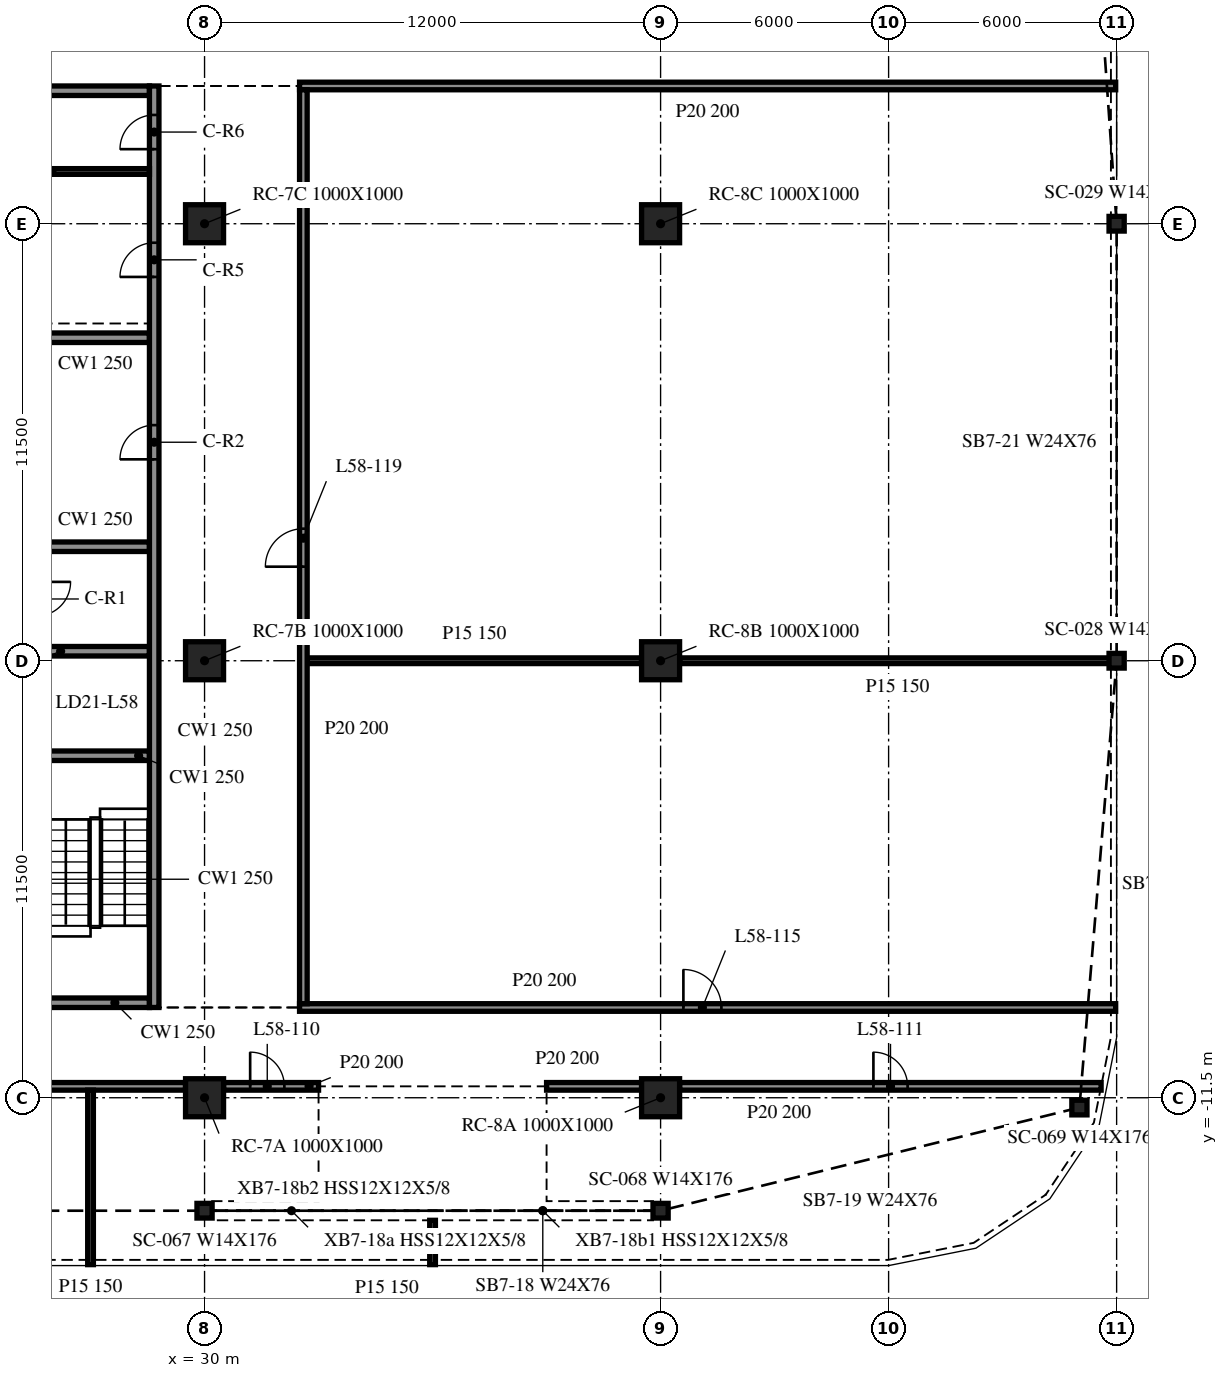
"""IFC4 building model, lengths in metres.
Left out: names, types, materials, properties, quantities, classifications, styles, units other than length and angle.
Written with IfcOpenShell. Run it as: python <this file> out.ifc"""

import sys

from ifc_helpers import new_model, si_unit, direction, frame, frame_2d, origin, origin_2d, place, context, subcontext, project, spatial, rectangle, i_section, extrude, element, fill, save


model = new_model("IFC4")
c1 = context("Model", 3, precision=1e-05, world=origin(), true_north=direction((0.0, 1.0)))
c2 = subcontext(c1, "Body", "Model", "MODEL_VIEW")
j1 = project(units=[si_unit("LENGTHUNIT", "METRE"), si_unit("PLANEANGLEUNIT", "RADIAN")], contexts=[c1])
p1 = place(None, origin())
s1 = spatial("IfcSite", under=j1, at=p1, CompositionType="ELEMENT")
p2 = place(p1, origin())
s2 = spatial("IfcBuilding", under=s1, at=p2, CompositionType="ELEMENT")
p3 = place(p2, frame((0.0, 0.0, 240.0)))
s3 = spatial("IfcBuildingStorey", under=s2, at=p3, CompositionType="ELEMENT", Elevation=240.0)
for number, where, z_axis, x_axis in (
    (1, (30.0, -11.5, -0.34), (0.0, 0.0, 1.0), (1.0, 0.0, 0.0)),
    (2, (30.0, 0.0, -0.34), (0.0, 0.0, 1.0), (1.0, 0.0, 0.0)),
    (3, (30.0, 11.5, -0.34), (0.0, 0.0, 1.0), (1.0, 0.0, 0.0)),
    (4, (42.0, -11.5, -0.34), (0.0, 0.0, 1.0), (1.0, 0.0, 0.0)),
    (5, (42.0, 0.0, -0.34), (0.0, 0.0, 1.0), (1.0, 0.0, 0.0)),
    (6, (42.0, 11.5, -0.34), (0.0, 0.0, 1.0), (1.0, 0.0, 0.0)),
):
    element("IfcColumn", number, at=place(p3, frame(where, z_axis=z_axis, x_axis=x_axis)), inside=s3, PredefinedType="COLUMN", context=c2, shape_type="SweptSolid", body=[
        extrude(rectangle(XDim=1.0, YDim=1.0, at=origin_2d()), origin(), (0.0, 0.0, 1.0), 3.8),
    ])
for number, where, z_axis, x_axis in (
    (7, (30.0, -14.473, -0.34), (0.0, 0.0, 1.0), (1.0, 0.0, 0.0)),
    (8, (42.0, -14.473, -0.34), (0.0, 0.0, 1.0), (1.0, 0.0, 0.0)),
    (9, (53.021, -11.758, -0.34), (0.0, 0.0, 1.0), (1.0, 0.0, 0.0)),
    (10, (54.0, 0.0, -0.34), (0.0, 0.0, 1.0), (1.0, 0.0, 0.0)),
    (11, (54.0, 11.5, -0.34), (0.0, 0.0, 1.0), (1.0, 0.0, 0.0)),
):
    element("IfcColumn", number, at=place(p3, frame(where, z_axis=z_axis, x_axis=x_axis)), inside=s3, PredefinedType="COLUMN", context=c2, shape_type="SweptSolid", body=[
        extrude(i_section(OverallWidth=0.399, OverallDepth=0.386, WebThickness=0.021, FlangeThickness=0.033, at=origin_2d()), origin(), (0.0, 0.0, 1.0), 3.8),
    ])
p4 = place(p3, frame((28.675, -9.125, 0.0), z_axis=(0.0, 0.0, 1.0), x_axis=(0.0, 1.0, 0.0)))
e12 = element("IfcWall", 12, at=p4, inside=s3, PredefinedType="SOLIDWALL", context=c2, shape_type="SweptSolid", body=[
    extrude(rectangle(XDim=24.25, YDim=0.25, at=frame_2d((12.125, 0.0))), origin(), (0.0, 0.0, 1.0), 3.46),
])
p5 = place(p4, frame((14.425, 0.0, 0.0)))
e13 = element("IfcOpeningElement", 13, at=p5, cuts=e12, PredefinedType="OPENING", context=c2, shape_type="SweptSolid", body=[
    extrude(rectangle(XDim=0.9, YDim=2.1, at=frame_2d((0.45, 1.05))), frame((0.0, 0.135, 0.0), z_axis=(0.0, -1.0, 0.0), x_axis=(1.0, 0.0, 0.0)), (0.0, 0.0, 1.0), 0.27),
])
p6 = place(p4, frame((19.225, 0.0, 0.0)))
e14 = element("IfcOpeningElement", 14, at=p6, cuts=e12, PredefinedType="OPENING", context=c2, shape_type="SweptSolid", body=[
    extrude(rectangle(XDim=0.9, YDim=2.1, at=frame_2d((0.45, 1.05))), frame((0.0, 0.135, 0.0), z_axis=(0.0, -1.0, 0.0), x_axis=(1.0, 0.0, 0.0)), (0.0, 0.0, 1.0), 0.27),
])
p7 = place(p4, frame((22.587, 0.0, 0.0)))
e15 = element("IfcOpeningElement", 15, at=p7, cuts=e12, PredefinedType="OPENING", context=c2, shape_type="SweptSolid", body=[
    extrude(rectangle(XDim=0.9, YDim=2.1, at=frame_2d((0.45, 1.05))), frame((0.0, 0.135, 0.0), z_axis=(0.0, -1.0, 0.0), x_axis=(1.0, 0.0, 0.0)), (0.0, 0.0, 1.0), 0.27),
])
p8 = place(p3, frame((28.55, -9.0, 0.0), z_axis=(0.0, 0.0, 1.0), x_axis=(-1.0, 0.0, 0.0)))
e16 = element("IfcWall", 16, at=p8, inside=s3, PredefinedType="SOLIDWALL", context=c2, shape_type="SweptSolid", body=[
    extrude(rectangle(XDim=9.1, YDim=0.25, at=frame_2d((4.55, 0.0))), origin(), (0.0, 0.0, 1.0), 3.46),
])
p9 = place(p8, frame((3.65, 0.0, 0.0)))
e17 = element("IfcOpeningElement", 17, at=p9, cuts=e16, PredefinedType="OPENING", context=c2, shape_type="SweptSolid", body=[
    extrude(rectangle(XDim=1.8, YDim=2.1, at=frame_2d((0.9, 1.05))), frame((0.0, 0.135, 0.0), z_axis=(0.0, -1.0, 0.0), x_axis=(1.0, 0.0, 0.0)), (0.0, 0.0, 1.0), 0.27),
])
p10 = place(p3, frame((19.45, 15.0, 0.0), z_axis=(0.0, 0.0, 1.0), x_axis=(1.0, 0.0, 0.0)))
e18 = element("IfcWall", 18, at=p10, inside=s3, PredefinedType="SOLIDWALL", context=c2, shape_type="SweptSolid", body=[
    extrude(rectangle(XDim=9.1, YDim=0.25, at=frame_2d((4.55, 0.0))), origin(), (0.0, 0.0, 1.0), 3.46),
])
p11 = place(p10, frame((3.65, 0.0, 0.0)))
e19 = element("IfcOpeningElement", 19, at=p11, cuts=e18, PredefinedType="OPENING", context=c2, shape_type="SweptSolid", body=[
    extrude(rectangle(XDim=1.8, YDim=2.1, at=frame_2d((0.9, 1.05))), frame((0.0, 0.135, 0.0), z_axis=(0.0, -1.0, 0.0), x_axis=(1.0, 0.0, 0.0)), (0.0, 0.0, 1.0), 0.27),
])
for number, where, z_axis, x_axis in (
    (20, (25.7, -2.5, 0.0), (0.0, 0.0, 1.0), (1.0, 0.0, 0.0)),
    (21, (25.7, 0.25, 0.0), (0.0, 0.0, 1.0), (1.0, 0.0, 0.0)),
    (22, (25.7, 3.0, 0.0), (0.0, 0.0, 1.0), (1.0, 0.0, 0.0)),
    (23, (25.7, 8.5, 0.0), (0.0, 0.0, 1.0), (1.0, 0.0, 0.0)),
):
    element("IfcWall", number, at=place(p3, frame(where, z_axis=z_axis, x_axis=x_axis)), inside=s3, PredefinedType="SOLIDWALL", context=c2, shape_type="SweptSolid", body=[
        extrude(rectangle(XDim=2.85, YDim=0.25, at=frame_2d((1.425, 0.0))), origin(), (0.0, 0.0, 1.0), 3.46),
    ])
p12 = place(p3, frame((25.7, 12.875, 0.0), z_axis=(0.0, 0.0, 1.0), x_axis=(1.0, 0.0, 0.0)))
e24 = element("IfcWall", 24, at=p12, inside=s3, PredefinedType="PARTITIONING", context=c2, shape_type="SweptSolid", body=[
    extrude(rectangle(XDim=2.85, YDim=0.15, at=frame_2d((1.425, 0.0))), origin(), (0.0, 0.0, 1.0), 3.46),
])
p13 = place(p3, frame((18.5, -11.2, 0.0), z_axis=(0.0, 0.0, 1.0), x_axis=(1.0, 0.0, 0.0)))
e25 = element("IfcWall", 25, at=p13, inside=s3, PredefinedType="PARTITIONING", context=c2, shape_type="SweptSolid", body=[
    extrude(rectangle(XDim=11.0, YDim=0.2, at=frame_2d((5.5, 0.0))), origin(), (0.0, 0.0, 1.0), 3.46),
])
p14 = place(p13, frame((4.9, 0.0, 0.0)))
e26 = element("IfcOpeningElement", 26, at=p14, cuts=e25, PredefinedType="OPENING", context=c2, shape_type="SweptSolid", body=[
    extrude(rectangle(XDim=1.2, YDim=2.1, at=frame_2d((0.6, 1.05))), frame((0.0, 0.11, 0.0), z_axis=(0.0, -1.0, 0.0), x_axis=(1.0, 0.0, 0.0)), (0.0, 0.0, 1.0), 0.22),
])
p15 = place(p3, frame((30.5, -11.2, 0.0), z_axis=(0.0, 0.0, 1.0), x_axis=(1.0, 0.0, 0.0)))
e27 = element("IfcWall", 27, at=p15, inside=s3, PredefinedType="PARTITIONING", context=c2, shape_type="SweptSolid", body=[
    extrude(rectangle(XDim=2.5, YDim=0.2, at=frame_2d((1.25, 0.0))), origin(), (0.0, 0.0, 1.0), 3.46),
])
p16 = place(p15, frame((0.7, 0.0, 0.0)))
e28 = element("IfcOpeningElement", 28, at=p16, cuts=e27, PredefinedType="OPENING", context=c2, shape_type="SweptSolid", body=[
    extrude(rectangle(XDim=0.9, YDim=2.1, at=frame_2d((0.45, 1.05))), frame((0.0, 0.11, 0.0), z_axis=(0.0, -1.0, 0.0), x_axis=(1.0, 0.0, 0.0)), (0.0, 0.0, 1.0), 0.22),
])
p17 = place(p3, frame((39.0, -11.2, 0.0), z_axis=(0.0, 0.0, 1.0), x_axis=(1.0, 0.0, 0.0)))
e29 = element("IfcWall", 29, at=p17, inside=s3, PredefinedType="PARTITIONING", context=c2, shape_type="SweptSolid", body=[
    extrude(rectangle(XDim=2.5, YDim=0.2, at=frame_2d((1.25, 0.0))), origin(), (0.0, 0.0, 1.0), 3.46),
])
p18 = place(p3, frame((42.5, -11.2, 0.0), z_axis=(0.0, 0.0, 1.0), x_axis=(1.0, 0.0, 0.0)))
e30 = element("IfcWall", 30, at=p18, inside=s3, PredefinedType="PARTITIONING", context=c2, shape_type="SweptSolid", body=[
    extrude(rectangle(XDim=11.092, YDim=0.2, at=frame_2d((5.546, 0.0))), origin(), (0.0, 0.0, 1.0), 3.46),
])
p19 = place(p18, frame((5.1, 0.0, 0.0)))
e31 = element("IfcOpeningElement", 31, at=p19, cuts=e30, PredefinedType="OPENING", context=c2, shape_type="SweptSolid", body=[
    extrude(rectangle(XDim=0.9, YDim=2.1, at=frame_2d((0.45, 1.05))), frame((0.0, 0.11, 0.0), z_axis=(0.0, -1.0, 0.0), x_axis=(1.0, 0.0, 0.0)), (0.0, 0.0, 1.0), 0.22),
])
p20 = place(p3, frame((32.5, -9.125, 0.0), z_axis=(0.0, 0.0, 1.0), x_axis=(1.0, 0.0, 0.0)))
e32 = element("IfcWall", 32, at=p20, inside=s3, PredefinedType="PARTITIONING", context=c2, shape_type="SweptSolid", body=[
    extrude(rectangle(XDim=21.475, YDim=0.2, at=frame_2d((10.738, 0.0))), origin(), (0.0, 0.0, 1.0), 3.46),
])
p21 = place(p20, frame((10.1, 0.0, 0.0)))
e33 = element("IfcOpeningElement", 33, at=p21, cuts=e32, PredefinedType="OPENING", context=c2, shape_type="SweptSolid", body=[
    extrude(rectangle(XDim=1.0, YDim=2.1, at=frame_2d((0.5, 1.05))), frame((0.0, 0.11, 0.0), z_axis=(0.0, -1.0, 0.0), x_axis=(1.0, 0.0, 0.0)), (0.0, 0.0, 1.0), 0.22),
])
p22 = place(p3, frame((32.7, 0.0, 0.0), z_axis=(0.0, 0.0, 1.0), x_axis=(1.0, 0.0, 0.0)))
e34 = element("IfcWall", 34, at=p22, inside=s3, PredefinedType="PARTITIONING", context=c2, shape_type="SweptSolid", body=[
    extrude(rectangle(XDim=8.8, YDim=0.15, at=frame_2d((4.4, 0.0))), origin(), (0.0, 0.0, 1.0), 3.46),
])
p23 = place(p3, frame((42.5, 0.0, 0.0), z_axis=(0.0, 0.0, 1.0), x_axis=(1.0, 0.0, 0.0)))
e35 = element("IfcWall", 35, at=p23, inside=s3, PredefinedType="PARTITIONING", context=c2, shape_type="SweptSolid", body=[
    extrude(rectangle(XDim=11.475, YDim=0.15, at=frame_2d((5.738, 0.0))), origin(), (0.0, 0.0, 1.0), 3.46),
])
p24 = place(p3, frame((32.5, 15.125, 0.0), z_axis=(0.0, 0.0, 1.0), x_axis=(1.0, 0.0, 0.0)))
e36 = element("IfcWall", 36, at=p24, inside=s3, PredefinedType="PARTITIONING", context=c2, shape_type="SweptSolid", body=[
    extrude(rectangle(XDim=21.475, YDim=0.2, at=frame_2d((10.738, 0.0))), origin(), (0.0, 0.0, 1.0), 3.46),
])
p25 = place(p3, frame((27.0, -15.892, 0.0), z_axis=(0.0, 0.0, 1.0), x_axis=(0.0, 1.0, 0.0)))
e37 = element("IfcWall", 37, at=p25, inside=s3, PredefinedType="PARTITIONING", context=c2, shape_type="SweptSolid", body=[
    extrude(rectangle(XDim=4.592, YDim=0.15, at=frame_2d((2.296, 0.0))), origin(), (0.0, 0.0, 1.0), 3.46),
])
p26 = place(p3, frame((32.6, -9.025, 0.0), z_axis=(0.0, 0.0, 1.0), x_axis=(0.0, 1.0, 0.0)))
e38 = element("IfcWall", 38, at=p26, inside=s3, PredefinedType="PARTITIONING", context=c2, shape_type="SweptSolid", body=[
    extrude(rectangle(XDim=24.05, YDim=0.2, at=frame_2d((12.025, 0.0))), origin(), (0.0, 0.0, 1.0), 3.46),
])
p27 = place(p26, frame((11.5, 0.0, 0.0)))
e39 = element("IfcOpeningElement", 39, at=p27, cuts=e38, PredefinedType="OPENING", context=c2, shape_type="SweptSolid", body=[
    extrude(rectangle(XDim=1.0, YDim=2.1, at=frame_2d((0.5, 1.05))), frame((0.0, 0.11, 0.0), z_axis=(0.0, -1.0, 0.0), x_axis=(1.0, 0.0, 0.0)), (0.0, 0.0, 1.0), 0.22),
])
p28 = place(p3, frame((36.0, -15.892, 0.0), z_axis=(0.0, 0.0, 1.0), x_axis=(0.0, 1.0, 0.0)))
e40 = element("IfcWall", 40, at=p28, inside=s3, PredefinedType="PARTITIONING", context=c2, shape_type="SweptSolid", body=[
    extrude(rectangle(XDim=1.167, YDim=0.15, at=frame_2d((0.583, 0.0))), origin(), (0.0, 0.0, 1.0), 3.46),
])
p29 = place(p5, origin())
e41 = element("IfcDoor", 41, at=p29, inside=s3, OperationType="SINGLE_SWING_RIGHT", PredefinedType="DOOR", context=c2, shape_type="SweptSolid", body=[
    extrude(rectangle(XDim=0.9, YDim=2.1, at=frame_2d((0.45, 1.05))), frame((0.0, 0.025, 0.0), z_axis=(0.0, -1.0, 0.0), x_axis=(1.0, 0.0, 0.0)), (0.0, 0.0, 1.0), 0.05),
])
fill(e13, e41)
p30 = place(p6, origin())
e42 = element("IfcDoor", 42, at=p30, inside=s3, OperationType="SINGLE_SWING_LEFT", PredefinedType="DOOR", context=c2, shape_type="SweptSolid", body=[
    extrude(rectangle(XDim=0.9, YDim=2.1, at=frame_2d((0.45, 1.05))), frame((0.0, 0.025, 0.0), z_axis=(0.0, -1.0, 0.0), x_axis=(1.0, 0.0, 0.0)), (0.0, 0.0, 1.0), 0.05),
])
fill(e14, e42)
p31 = place(p7, origin())
e43 = element("IfcDoor", 43, at=p31, inside=s3, OperationType="SINGLE_SWING_RIGHT", PredefinedType="DOOR", context=c2, shape_type="SweptSolid", body=[
    extrude(rectangle(XDim=0.9, YDim=2.1, at=frame_2d((0.45, 1.05))), frame((0.0, 0.025, 0.0), z_axis=(0.0, -1.0, 0.0), x_axis=(1.0, 0.0, 0.0)), (0.0, 0.0, 1.0), 0.05),
])
fill(e15, e43)
p32 = place(p16, origin())
e44 = element("IfcDoor", 44, at=p32, inside=s3, OperationType="SINGLE_SWING_RIGHT", PredefinedType="DOOR", context=c2, shape_type="SweptSolid", body=[
    extrude(rectangle(XDim=0.9, YDim=2.1, at=frame_2d((0.45, 1.05))), frame((0.0, 0.025, 0.0), z_axis=(0.0, -1.0, 0.0), x_axis=(1.0, 0.0, 0.0)), (0.0, 0.0, 1.0), 0.05),
])
fill(e28, e44)
p33 = place(p19, origin())
e45 = element("IfcDoor", 45, at=p33, inside=s3, OperationType="SINGLE_SWING_LEFT", PredefinedType="DOOR", context=c2, shape_type="SweptSolid", body=[
    extrude(rectangle(XDim=0.9, YDim=2.1, at=frame_2d((0.45, 1.05))), frame((0.0, 0.025, 0.0), z_axis=(0.0, -1.0, 0.0), x_axis=(1.0, 0.0, 0.0)), (0.0, 0.0, 1.0), 0.05),
])
fill(e31, e45)
p34 = place(p21, origin())
e46 = element("IfcDoor", 46, at=p34, inside=s3, OperationType="SINGLE_SWING_LEFT", PredefinedType="DOOR", context=c2, shape_type="SweptSolid", body=[
    extrude(rectangle(XDim=1.0, YDim=2.1, at=frame_2d((0.5, 1.05))), frame((0.0, 0.025, 0.0), z_axis=(0.0, -1.0, 0.0), x_axis=(1.0, 0.0, 0.0)), (0.0, 0.0, 1.0), 0.05),
])
fill(e33, e46)
p35 = place(p27, origin())
e47 = element("IfcDoor", 47, at=p35, inside=s3, OperationType="SINGLE_SWING_RIGHT", PredefinedType="DOOR", context=c2, shape_type="SweptSolid", body=[
    extrude(rectangle(XDim=1.0, YDim=2.1, at=frame_2d((0.5, 1.05))), frame((0.0, 0.025, 0.0), z_axis=(0.0, -1.0, 0.0), x_axis=(1.0, 0.0, 0.0)), (0.0, 0.0, 1.0), 0.05),
])
fill(e39, e47)
save(model, sys.argv[1])
